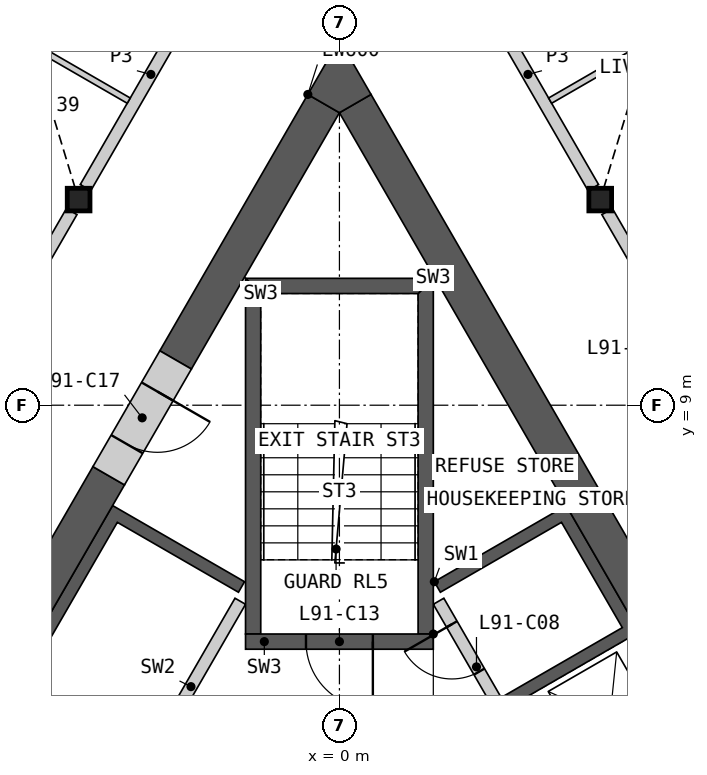
"""IFC4 building model, lengths in metres.
Left out: names, types, materials, properties, quantities, classifications, styles, units other than length and angle.
Written with IfcOpenShell. Run it as: python <this file> out.ifc"""

import sys

from ifc_helpers import new_model, si_unit, direction, frame, frame_2d, origin, origin_2d, place, context, subcontext, project, spatial, polyline, rectangle, i_section, outline, extrude, element, fill, save


model = new_model("IFC4")
c1 = context("Model", 3, precision=1e-05, world=origin(), true_north=direction((0.0, 1.0)))
c2 = subcontext(c1, "Body", "Model", "MODEL_VIEW")
j1 = project(units=[si_unit("LENGTHUNIT", "METRE"), si_unit("PLANEANGLEUNIT", "RADIAN")], contexts=[c1])
p1 = place(None, origin())
s1 = spatial("IfcSite", under=j1, at=p1, CompositionType="ELEMENT")
p2 = place(p1, origin())
s2 = spatial("IfcBuilding", under=s1, at=p2, CompositionType="ELEMENT")
p3 = place(p2, frame((0.0, 0.0, 398.4)))
s3 = spatial("IfcBuildingStorey", under=s2, at=p3, CompositionType="ELEMENT", Elevation=398.4)
for number, where, z_axis, x_axis in (
    (1, (-4.289, 12.382, 0.0), (0.0, 0.0, 1.0), (1.0, 0.0, 0.0)),
    (2, (4.289, 12.382, 0.0), (0.0, 0.0, 1.0), (1.0, 0.0, 0.0)),
):
    element("IfcColumn", number, at=place(p3, frame(where, z_axis=z_axis, x_axis=x_axis)), inside=s3, PredefinedType="COLUMN", context=c2, shape_type="SweptSolid", body=[
        extrude(i_section(OverallWidth=0.374, OverallDepth=0.372, WebThickness=0.016, FlangeThickness=0.026, at=origin_2d()), origin(), (0.0, 0.0, 1.0), 3.4),
    ])
p4 = place(p3, origin())
e3 = element("IfcWall", 3, at=p4, inside=s3, PredefinedType="SHEAR", context=c2, shape_type="SweptSolid", body=[
    extrude(outline(polyline([(1.561, 6.097), (3.731, 7.35), (8.231, -0.444), (6.061, -1.697), (5.96, -1.524), (7.952, -0.374), (6.952, 1.358), (4.96, 0.208), (4.861, 0.381), (6.852, 1.531), (5.852, 3.263), (3.861, 2.113), (3.76, 2.287), (5.752, 3.437), (4.752, 5.169), (2.76, 4.019), (2.66, 4.192), (4.652, 5.342), (3.652, 7.074), (1.66, 5.924), (1.561, 6.097)])), origin(), (0.0, 0.0, 1.0), 3.1),
])
p5 = place(p3, frame((5.817, -1.476, 0.0), z_axis=(0.0, 0.0, 1.0), x_axis=(-0.500002616675, 0.866023893041, 0.0)))
e4 = element("IfcWall", 4, at=p5, inside=s3, PredefinedType="SOLIDWALL", context=c2, shape_type="SweptSolid", body=[
    extrude(rectangle(XDim=8.373, YDim=0.2, at=frame_2d((4.187, 0.0))), origin(), (0.0, 0.0, 1.0), 3.1),
])
p6 = place(p5, frame((0.337, 0.0, 0.0)))
e5 = element("IfcOpeningElement", 5, at=p6, cuts=e4, PredefinedType="OPENING", context=c2, shape_type="SweptSolid", body=[
    extrude(rectangle(XDim=1.1, YDim=2.1, at=frame_2d((0.55, 1.05))), frame((0.0, 0.11, 0.0), z_axis=(0.0, -1.0, 0.0), x_axis=(1.0, 0.0, 0.0)), (0.0, 0.0, 1.0), 0.22),
])
p7 = place(p5, frame((2.537, 0.0, 0.0)))
e6 = element("IfcOpeningElement", 6, at=p7, cuts=e4, PredefinedType="OPENING", context=c2, shape_type="SweptSolid", body=[
    extrude(rectangle(XDim=1.1, YDim=2.1, at=frame_2d((0.55, 1.05))), frame((0.0, 0.11, 0.0), z_axis=(0.0, -1.0, 0.0), x_axis=(1.0, 0.0, 0.0)), (0.0, 0.0, 1.0), 0.22),
])
p8 = place(p5, frame((4.737, 0.0, 0.0)))
e7 = element("IfcOpeningElement", 7, at=p8, cuts=e4, PredefinedType="OPENING", context=c2, shape_type="SweptSolid", body=[
    extrude(rectangle(XDim=1.1, YDim=2.1, at=frame_2d((0.55, 1.05))), frame((0.0, 0.11, 0.0), z_axis=(0.0, -1.0, 0.0), x_axis=(1.0, 0.0, 0.0)), (0.0, 0.0, 1.0), 0.22),
])
p9 = place(p5, frame((7.037, 0.0, 0.0)))
e8 = element("IfcOpeningElement", 8, at=p9, cuts=e4, PredefinedType="OPENING", context=c2, shape_type="SweptSolid", body=[
    extrude(rectangle(XDim=0.9, YDim=2.1, at=frame_2d((0.45, 1.05))), frame((0.0, 0.11, 0.0), z_axis=(0.0, -1.0, 0.0), x_axis=(1.0, 0.0, 0.0)), (0.0, 0.0, 1.0), 0.22),
])
p10 = place(p3, origin())
e9 = element("IfcWall", 9, at=p10, inside=s3, PredefinedType="SHEAR", context=c2, shape_type="SweptSolid", body=[
    extrude(outline(polyline([(-4.96, 0.208), (-7.131, 1.461), (-3.731, 7.35), (-1.561, 6.097), (-1.66, 5.924), (-3.652, 7.074), (-6.852, 1.531), (-4.861, 0.381), (-4.96, 0.208)])), origin(), (0.0, 0.0, 1.0), 3.1),
])
p11 = place(p3, frame((-1.631, 5.776, 0.0), z_axis=(0.0, 0.0, 1.0), x_axis=(-0.499992876559, -0.866029516466, 0.0)))
e10 = element("IfcWall", 10, at=p11, inside=s3, PredefinedType="SOLIDWALL", context=c2, shape_type="SweptSolid", body=[
    extrude(rectangle(XDim=6.486, YDim=0.2, at=frame_2d((3.243, 0.0))), origin(), (0.0, 0.0, 1.0), 3.1),
])
p12 = place(p11, frame((2.637, 0.0, 0.0)))
e11 = element("IfcOpeningElement", 11, at=p12, cuts=e10, PredefinedType="OPENING", context=c2, shape_type="SweptSolid", body=[
    extrude(rectangle(XDim=0.9, YDim=2.1, at=frame_2d((0.45, 1.05))), frame((0.0, 0.11, 0.0), z_axis=(0.0, -1.0, 0.0), x_axis=(1.0, 0.0, 0.0)), (0.0, 0.0, 1.0), 0.22),
])
p13 = place(p3, origin())
e12 = element("IfcWall", 12, at=p13, inside=s3, PredefinedType="SHEAR", context=c2, shape_type="SweptSolid", body=[
    extrude(outline(polyline([(1.544, 5.237), (1.544, 11.087), (1.294, 10.837), (1.294, 5.237), (1.544, 5.237)])), origin(), (0.0, 0.0, 1.0), 3.1),
])
p14 = place(p3, origin())
e13 = element("IfcWall", 13, at=p14, inside=s3, PredefinedType="SHEAR", context=c2, shape_type="SweptSolid", body=[
    extrude(outline(polyline([(1.544, 11.087), (-1.544, 11.087), (-1.294, 10.837), (1.294, 10.837), (1.544, 11.087)])), origin(), (0.0, 0.0, 1.0), 3.1),
])
p15 = place(p3, origin())
e14 = element("IfcWall", 14, at=p15, inside=s3, PredefinedType="SHEAR", context=c2, shape_type="SweptSolid", body=[
    extrude(outline(polyline([(-1.294, 10.837), (-1.544, 11.087), (-1.544, 5.237), (-1.294, 5.237), (-1.294, 10.837)])), origin(), (0.0, 0.0, 1.0), 3.1),
])
p16 = place(p3, frame((1.544, 5.112, 0.0), z_axis=(0.0, 0.0, 1.0), x_axis=(-1.0, 0.0, 0.0)))
e15 = element("IfcWall", 15, at=p16, inside=s3, PredefinedType="SHEAR", context=c2, shape_type="SweptSolid", body=[
    extrude(rectangle(XDim=3.088, YDim=0.25, at=frame_2d((1.544, 0.0))), origin(), (0.0, 0.0, 1.0), 3.1),
])
p17 = place(p16, frame((0.994, 0.0, 0.0)))
e16 = element("IfcOpeningElement", 16, at=p17, cuts=e15, PredefinedType="OPENING", context=c2, shape_type="SweptSolid", body=[
    extrude(rectangle(XDim=1.1, YDim=2.1, at=frame_2d((0.55, 1.05))), frame((0.0, 0.135, 0.0), z_axis=(0.0, -1.0, 0.0), x_axis=(1.0, 0.0, 0.0)), (0.0, 0.0, 1.0), 0.27),
])
p18 = place(p3, frame((8.686, -0.634, 0.0), z_axis=(0.0, 0.0, 1.0), x_axis=(-0.500004601921, 0.866022746848, 0.0)))
e17 = element("IfcWall", 17, at=p18, inside=s3, PredefinedType="SHEAR", context=c2, shape_type="SweptSolid", body=[
    extrude(rectangle(XDim=16.853, YDim=0.6, at=frame_2d((8.426, 0.0))), origin(), (0.0, 0.0, 1.0), 3.1),
])
p19 = place(p3, frame((-3.794, 7.84, 0.0), z_axis=(0.0, 0.0, 1.0), x_axis=(-0.499974747889, -0.866039982607, 0.0)))
e18 = element("IfcWall", 18, at=p19, inside=s3, PredefinedType="SHEAR", context=c2, shape_type="SweptSolid", body=[
    extrude(rectangle(XDim=7.092, YDim=0.6, at=frame_2d((3.546, 0.0))), origin(), (0.0, 0.0, 1.0), 3.1),
])
p20 = place(p3, frame((-0.26, 13.961, 0.0), z_axis=(0.0, 0.0, 1.0), x_axis=(-0.50000604952, -0.866021911064, 0.0)))
e19 = element("IfcWall", 19, at=p20, inside=s3, PredefinedType="SHEAR", context=c2, shape_type="SweptSolid", body=[
    extrude(rectangle(XDim=4.869, YDim=0.6, at=frame_2d((2.434, 0.0))), origin(), (0.0, 0.0, 1.0), 3.1),
])
p21 = place(p3, origin())
e20 = element("IfcWall", 20, at=p21, inside=s3, PredefinedType="SHEAR", context=c2, shape_type="SweptSolid", body=[
    extrude(outline(polyline([(-0.52, 14.111), (0.0, 15.011), (0.52, 14.111), (0.0, 13.811), (-0.52, 14.111)])), origin(), (0.0, 0.0, 1.0), 3.1),
])
p22 = place(p3, frame((-2.694, 9.745, 0.0), z_axis=(0.0, 0.0, 1.0), x_axis=(-0.50002983664, -0.866008176907, 0.0)))
e21 = element("IfcWall", 21, at=p22, inside=s3, PredefinedType="SHEAR", context=c2, shape_type="SweptSolid", body=[
    extrude(rectangle(XDim=2.2, YDim=0.6, at=frame_2d((1.1, 0.0))), origin(), (0.0, 0.0, 1.0), 3.1),
])
p23 = place(p22, frame((0.6, 0.0, 0.0)))
e22 = element("IfcOpeningElement", 22, at=p23, cuts=e21, PredefinedType="OPENING", context=c2, shape_type="SweptSolid", body=[
    extrude(rectangle(XDim=1.0, YDim=2.1, at=frame_2d((0.5, 1.05))), frame((0.0, 0.31, 0.0), z_axis=(0.0, -1.0, 0.0), x_axis=(1.0, 0.0, 0.0)), (0.0, 0.0, 1.0), 0.62),
])
p24 = place(p3, frame((4.403, 12.185, 0.0), z_axis=(0.0, 0.0, 1.0), x_axis=(0.499992155518, -0.866029932751, 0.0)))
e23 = element("IfcWall", 23, at=p24, inside=s3, PredefinedType="PARTITIONING", context=c2, shape_type="SweptSolid", body=[
    extrude(rectangle(XDim=8.123, YDim=0.2, at=frame_2d((4.062, 0.0))), origin(), (0.0, 0.0, 1.0), 3.1),
])
p25 = place(p24, frame((3.963, 0.0, 0.0)))
e24 = element("IfcOpeningElement", 24, at=p25, cuts=e23, PredefinedType="OPENING", context=c2, shape_type="SweptSolid", body=[
    extrude(rectangle(XDim=1.0, YDim=2.1, at=frame_2d((0.5, 1.05))), frame((0.0, 0.11, 0.0), z_axis=(0.0, -1.0, 0.0), x_axis=(1.0, 0.0, 0.0)), (0.0, 0.0, 1.0), 0.22),
])
p26 = place(p24, frame((1.153, 0.0, 0.0)))
e25 = element("IfcOpeningElement", 25, at=p26, cuts=e23, PredefinedType="OPENING", context=c2, shape_type="SweptSolid", body=[
    extrude(rectangle(XDim=1.0, YDim=2.1, at=frame_2d((0.5, 1.05))), frame((0.0, 0.11, 0.0), z_axis=(0.0, -1.0, 0.0), x_axis=(1.0, 0.0, 0.0)), (0.0, 0.0, 1.0), 0.22),
])
p27 = place(p3, frame((-8.465, 5.15, 0.0), z_axis=(0.0, 0.0, 1.0), x_axis=(0.499992155518, 0.866029932751, 0.0)))
e26 = element("IfcWall", 26, at=p27, inside=s3, PredefinedType="PARTITIONING", context=c2, shape_type="SweptSolid", body=[
    extrude(rectangle(XDim=8.123, YDim=0.2, at=frame_2d((4.062, 0.0))), origin(), (0.0, 0.0, 1.0), 3.1),
])
p28 = place(p27, frame((5.97, 0.0, 0.0)))
e27 = element("IfcOpeningElement", 27, at=p28, cuts=e26, PredefinedType="OPENING", context=c2, shape_type="SweptSolid", body=[
    extrude(rectangle(XDim=1.0, YDim=2.1, at=frame_2d((0.5, 1.05))), frame((0.0, 0.11, 0.0), z_axis=(0.0, -1.0, 0.0), x_axis=(1.0, 0.0, 0.0)), (0.0, 0.0, 1.0), 0.22),
])
p29 = place(p27, frame((0.832, 0.0, 0.0)))
e28 = element("IfcOpeningElement", 28, at=p29, cuts=e26, PredefinedType="OPENING", context=c2, shape_type="SweptSolid", body=[
    extrude(rectangle(XDim=1.0, YDim=2.1, at=frame_2d((0.5, 1.05))), frame((0.0, 0.11, 0.0), z_axis=(0.0, -1.0, 0.0), x_axis=(1.0, 0.0, 0.0)), (0.0, 0.0, 1.0), 0.22),
])
for number, where, z_axis, x_axis in (
    (29, (2.025, 16.303, 0.0), (0.0, 0.0, 1.0), (0.5, -0.866, 0.0)),
    (30, (-4.176, 12.579, 0.0), (0.0, 0.0, 1.0), (0.5, 0.866, 0.0)),
):
    element("IfcWall", number, at=place(p3, frame(where, z_axis=z_axis, x_axis=x_axis)), inside=s3, PredefinedType="PARTITIONING", context=c2, shape_type="SweptSolid", body=[
        extrude(rectangle(XDim=4.3, YDim=0.2, at=frame_2d((2.15, 0.0))), origin(), (0.0, 0.0, 1.0), 3.1),
    ])
p30 = place(p3, frame((-13.669, 19.9, 0.0), z_axis=(0.0, 0.0, 1.0), x_axis=(0.866032376801, -0.499987922186, 0.0)))
e31 = element("IfcWall", 31, at=p30, inside=s3, PredefinedType="PARTITIONING", context=c2, shape_type="SweptSolid", body=[
    extrude(rectangle(XDim=11.782, YDim=0.1, at=frame_2d((5.891, 0.0))), origin(), (0.0, 0.0, 1.0), 2.33),
])
p31 = place(p30, frame((3.661, 0.0, 0.0)))
e32 = element("IfcOpeningElement", 32, at=p31, cuts=e31, PredefinedType="OPENING", context=c2, shape_type="SweptSolid", body=[
    extrude(rectangle(XDim=0.95, YDim=2.1, at=frame_2d((0.475, 1.05))), frame((0.0, 0.06, 0.0), z_axis=(0.0, -1.0, 0.0), x_axis=(1.0, 0.0, 0.0)), (0.0, 0.0, 1.0), 0.12),
])
p32 = place(p3, frame((3.465, 14.01, 0.0), z_axis=(0.0, 0.0, 1.0), x_axis=(0.866032376801, 0.499987922186, 0.0)))
e33 = element("IfcWall", 33, at=p32, inside=s3, PredefinedType="PARTITIONING", context=c2, shape_type="SweptSolid", body=[
    extrude(rectangle(XDim=11.782, YDim=0.1, at=frame_2d((5.891, 0.0))), origin(), (0.0, 0.0, 1.0), 2.33),
])
p33 = place(p32, frame((7.171, 0.0, 0.0)))
e34 = element("IfcOpeningElement", 34, at=p33, cuts=e33, PredefinedType="OPENING", context=c2, shape_type="SweptSolid", body=[
    extrude(rectangle(XDim=0.95, YDim=2.1, at=frame_2d((0.475, 1.05))), frame((0.0, 0.06, 0.0), z_axis=(0.0, -1.0, 0.0), x_axis=(1.0, 0.0, 0.0)), (0.0, 0.0, 1.0), 0.12),
])
p34 = place(p9, origin())
e35 = element("IfcDoor", 35, at=p34, inside=s3, OperationType="SINGLE_SWING_RIGHT", PredefinedType="DOOR", context=c2, shape_type="SweptSolid", body=[
    extrude(rectangle(XDim=0.9, YDim=2.1, at=frame_2d((0.45, 1.05))), frame((0.0, 0.025, 0.0), z_axis=(0.0, -1.0, 0.0), x_axis=(1.0, 0.0, 0.0)), (0.0, 0.0, 1.0), 0.05),
])
fill(e8, e35)
p35 = place(p17, origin())
e36 = element("IfcDoor", 36, at=p35, inside=s3, OperationType="SINGLE_SWING_LEFT", PredefinedType="DOOR", context=c2, shape_type="SweptSolid", body=[
    extrude(rectangle(XDim=1.1, YDim=2.1, at=frame_2d((0.55, 1.05))), frame((0.0, 0.025, 0.0), z_axis=(0.0, -1.0, 0.0), x_axis=(1.0, 0.0, 0.0)), (0.0, 0.0, 1.0), 0.05),
])
fill(e16, e36)
p36 = place(p23, origin())
e37 = element("IfcDoor", 37, at=p36, inside=s3, OperationType="SINGLE_SWING_LEFT", PredefinedType="DOOR", context=c2, shape_type="SweptSolid", body=[
    extrude(rectangle(XDim=1.0, YDim=2.1, at=frame_2d((0.5, 1.05))), frame((0.0, 0.055, 0.0), z_axis=(0.0, -1.0, 0.0), x_axis=(1.0, 0.0, 0.0)), (0.0, 0.0, 1.0), 0.05),
])
fill(e22, e37)
save(model, sys.argv[1])
